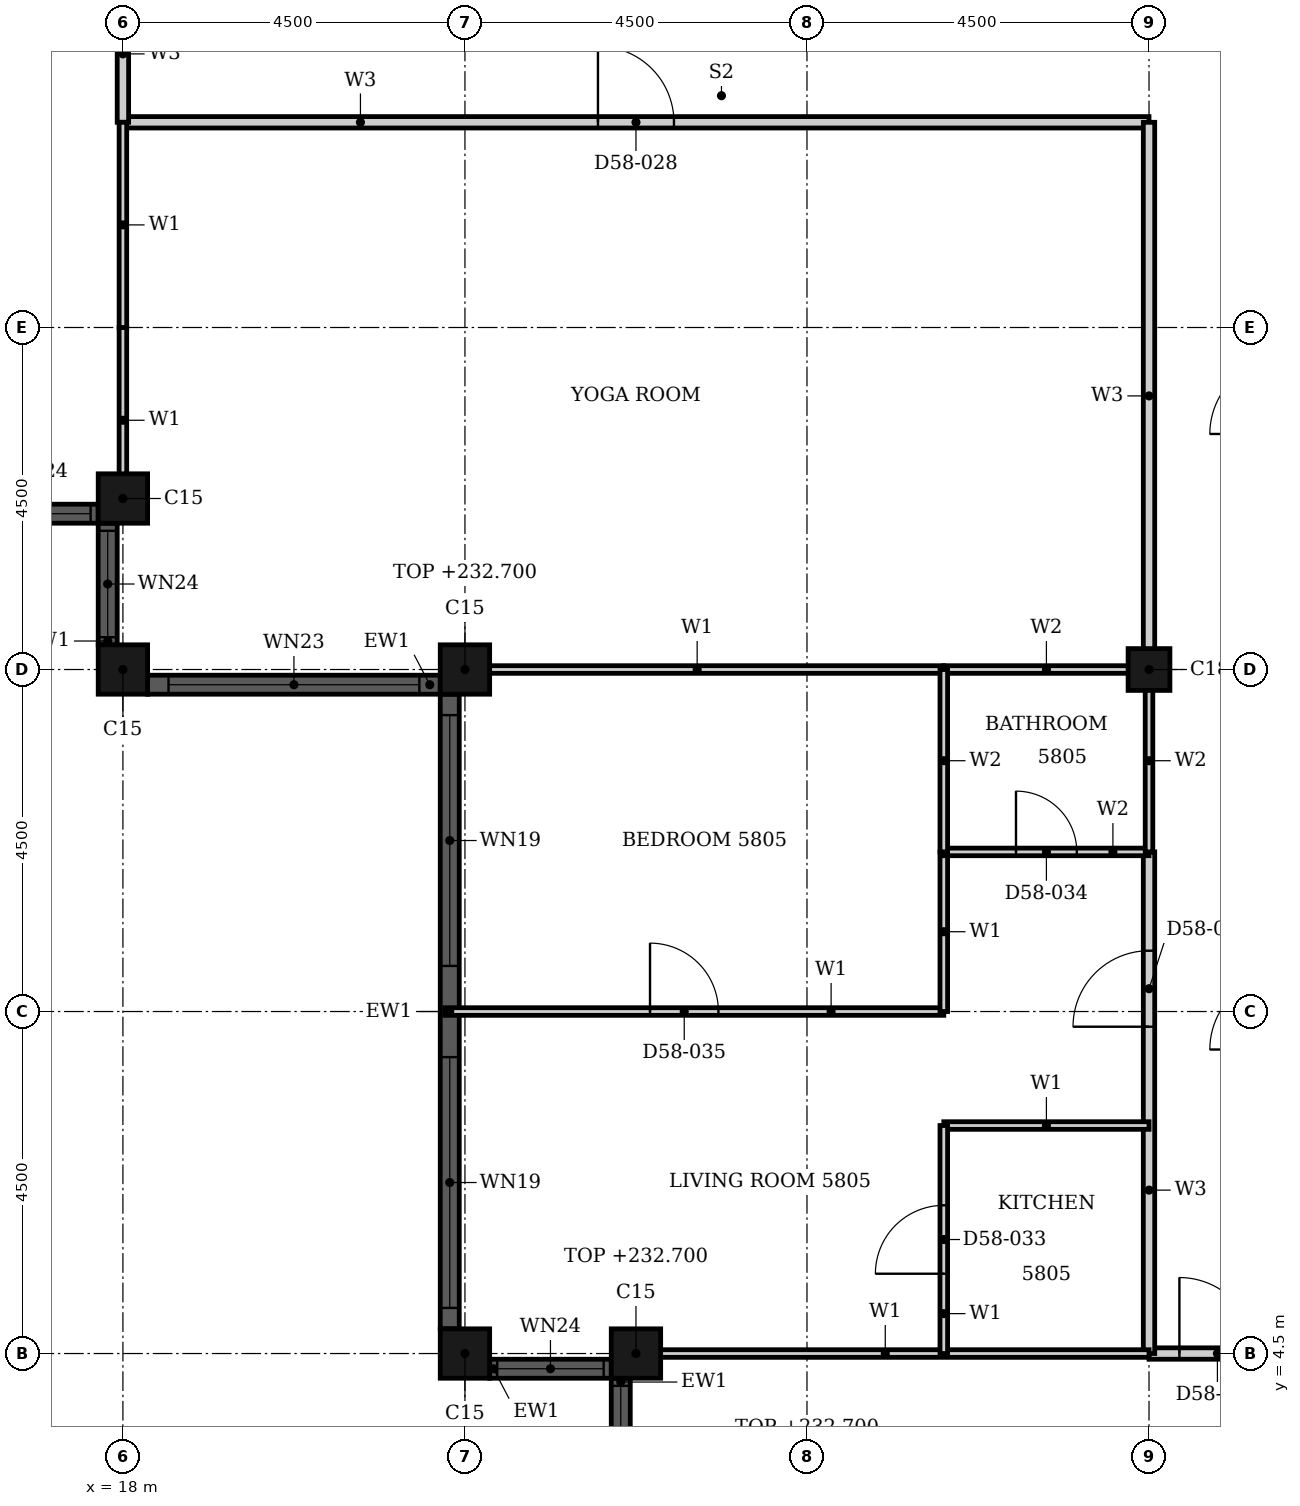
"""IFC4 building model, lengths in metres.
Left out: names, types, materials, properties, quantities, classifications, styles, units other than length and angle.
Written with IfcOpenShell. Run it as: python <this file> out.ifc"""

import sys

from ifc_helpers import new_model, si_unit, direction, frame, frame_2d, origin, origin_2d, place, context, subcontext, project, spatial, rectangle, hollow_rectangle, extrude, element, fill, save


model = new_model("IFC4")
c1 = context("Model", 3, precision=1e-05, world=origin(), true_north=direction((0.0, 1.0)))
c2 = subcontext(c1, "Body", "Model", "MODEL_VIEW")
j1 = project(units=[si_unit("LENGTHUNIT", "METRE"), si_unit("PLANEANGLEUNIT", "RADIAN")], contexts=[c1])
p1 = place(None, origin())
s1 = spatial("IfcSite", under=j1, at=p1, CompositionType="ELEMENT")
p2 = place(p1, origin())
s2 = spatial("IfcBuilding", under=s1, at=p2, CompositionType="ELEMENT")
p3 = place(p2, frame((0.0, 0.0, 229.4)))
s3 = spatial("IfcBuildingStorey", under=s2, at=p3, CompositionType="ELEMENT", Elevation=229.4)
for number, where, z_axis, x_axis in (
    (1, (18.0, 15.75, 0.0), (0.0, 0.0, 1.0), (1.0, 0.0, 0.0)),
    (2, (18.0, 13.5, 0.0), (0.0, 0.0, 1.0), (1.0, 0.0, 0.0)),
):
    element("IfcColumn", number, at=place(p3, frame(where, z_axis=z_axis, x_axis=x_axis)), inside=s3, PredefinedType="COLUMN", context=c2, shape_type="SweptSolid", body=[
        extrude(hollow_rectangle(XDim=0.65, YDim=0.65, WallThickness=0.021, at=origin_2d()), origin(), (0.0, 0.0, 1.0), 3.7),
    ])
for number, where, z_axis, x_axis in (
    (3, (22.5, 13.5, 0.0), (0.0, 0.0, 1.0), (1.0, 0.0, 0.0)),
    (4, (22.5, 4.5, 0.0), (0.0, 0.0, 1.0), (1.0, 0.0, 0.0)),
    (5, (24.75, 4.5, 0.0), (0.0, 0.0, 1.0), (1.0, 0.0, 0.0)),
):
    element("IfcColumn", number, at=place(p3, frame(where, z_axis=z_axis, x_axis=x_axis)), inside=s3, PredefinedType="COLUMN", context=c2, shape_type="SweptSolid", body=[
        extrude(hollow_rectangle(XDim=0.65, YDim=0.65, WallThickness=0.021, at=origin_2d()), origin(), (0.0, 0.0, 1.0), 3.3),
    ])
p4 = place(p3, frame((31.5, 13.5, 0.0), z_axis=(0.0, 0.0, 1.0), x_axis=(1.0, 0.0, 0.0)))
e6 = element("IfcColumn", 6, at=p4, inside=s3, PredefinedType="COLUMN", context=c2, shape_type="SweptSolid", body=[
    extrude(hollow_rectangle(XDim=0.55, YDim=0.55, WallThickness=0.018, at=origin_2d()), origin(), (0.0, 0.0, 1.0), 3.3),
])
p5 = place(p3, frame((16.075, 15.55, 0.0), z_axis=(0.0, 0.0, 1.0), x_axis=(1.0, 0.0, 0.0)))
e7 = element("IfcWall", 7, at=p5, inside=s3, PredefinedType="SOLIDWALL", context=c2, shape_type="SweptSolid", body=[
    extrude(rectangle(XDim=1.6, YDim=0.25, at=frame_2d((0.8, 0.0))), origin(), (0.0, 0.0, 1.0), 3.7),
])
p6 = place(p5, frame((0.1, 0.0, 0.9)))
e8 = element("IfcOpeningElement", 8, at=p6, cuts=e7, PredefinedType="OPENING", context=c2, shape_type="SweptSolid", body=[
    extrude(rectangle(XDim=1.4, YDim=1.75, at=frame_2d((0.7, 0.875))), frame((0.0, 0.135, 0.0), z_axis=(0.0, -1.0, 0.0), x_axis=(1.0, 0.0, 0.0)), (0.0, 0.0, 1.0), 0.27),
])
p7 = place(p3, frame((17.8, 15.425, 0.0), z_axis=(0.0, 0.0, 1.0), x_axis=(0.0, -1.0, 0.0)))
e9 = element("IfcWall", 9, at=p7, inside=s3, PredefinedType="SOLIDWALL", context=c2, shape_type="SweptSolid", body=[
    extrude(rectangle(XDim=1.6, YDim=0.25, at=frame_2d((0.8, 0.0))), origin(), (0.0, 0.0, 1.0), 3.7),
])
p8 = place(p7, frame((0.1, 0.0, 0.9)))
e10 = element("IfcOpeningElement", 10, at=p8, cuts=e9, PredefinedType="OPENING", context=c2, shape_type="SweptSolid", body=[
    extrude(rectangle(XDim=1.4, YDim=1.75, at=frame_2d((0.7, 0.875))), frame((0.0, 0.135, 0.0), z_axis=(0.0, -1.0, 0.0), x_axis=(1.0, 0.0, 0.0)), (0.0, 0.0, 1.0), 0.27),
])
p9 = place(p3, frame((18.325, 13.3, 0.0), z_axis=(0.0, 0.0, 1.0), x_axis=(1.0, 0.0, 0.0)))
e11 = element("IfcWall", 11, at=p9, inside=s3, PredefinedType="SOLIDWALL", context=c2, shape_type="SweptSolid", body=[
    extrude(rectangle(XDim=3.85, YDim=0.25, at=frame_2d((1.925, 0.0))), origin(), (0.0, 0.0, 1.0), 3.7),
])
p10 = place(p9, frame((0.275, 0.0, 0.45)))
e12 = element("IfcOpeningElement", 12, at=p10, cuts=e11, PredefinedType="OPENING", context=c2, shape_type="SweptSolid", body=[
    extrude(rectangle(XDim=3.3, YDim=1.9, at=frame_2d((1.65, 0.95))), frame((0.0, 0.135, 0.0), z_axis=(0.0, -1.0, 0.0), x_axis=(1.0, 0.0, 0.0)), (0.0, 0.0, 1.0), 0.27),
])
p11 = place(p3, frame((22.3, 13.175, 0.0), z_axis=(0.0, 0.0, 1.0), x_axis=(0.0, -1.0, 0.0)))
e13 = element("IfcWall", 13, at=p11, inside=s3, PredefinedType="SOLIDWALL", context=c2, shape_type="SweptSolid", body=[
    extrude(rectangle(XDim=8.35, YDim=0.25, at=frame_2d((4.175, 0.0))), origin(), (0.0, 0.0, 1.0), 3.7),
])
p12 = place(p11, frame((0.275, 0.0, 0.45)))
e14 = element("IfcOpeningElement", 14, at=p12, cuts=e13, PredefinedType="OPENING", context=c2, shape_type="SweptSolid", body=[
    extrude(rectangle(XDim=3.3, YDim=2.2, at=frame_2d((1.65, 1.1))), frame((0.0, 0.135, 0.0), z_axis=(0.0, -1.0, 0.0), x_axis=(1.0, 0.0, 0.0)), (0.0, 0.0, 1.0), 0.27),
])
p13 = place(p11, frame((4.775, 0.0, 0.45)))
e15 = element("IfcOpeningElement", 15, at=p13, cuts=e13, PredefinedType="OPENING", context=c2, shape_type="SweptSolid", body=[
    extrude(rectangle(XDim=3.3, YDim=2.2, at=frame_2d((1.65, 1.1))), frame((0.0, 0.135, 0.0), z_axis=(0.0, -1.0, 0.0), x_axis=(1.0, 0.0, 0.0)), (0.0, 0.0, 1.0), 0.27),
])
p14 = place(p3, frame((22.825, 4.3, 0.0), z_axis=(0.0, 0.0, 1.0), x_axis=(1.0, 0.0, 0.0)))
e16 = element("IfcWall", 16, at=p14, inside=s3, PredefinedType="SOLIDWALL", context=c2, shape_type="SweptSolid", body=[
    extrude(rectangle(XDim=1.6, YDim=0.25, at=frame_2d((0.8, 0.0))), origin(), (0.0, 0.0, 1.0), 3.7),
])
p15 = place(p14, frame((0.1, 0.0, 0.9)))
e17 = element("IfcOpeningElement", 17, at=p15, cuts=e16, PredefinedType="OPENING", context=c2, shape_type="SweptSolid", body=[
    extrude(rectangle(XDim=1.4, YDim=1.75, at=frame_2d((0.7, 0.875))), frame((0.0, 0.135, 0.0), z_axis=(0.0, -1.0, 0.0), x_axis=(1.0, 0.0, 0.0)), (0.0, 0.0, 1.0), 0.27),
])
p16 = place(p3, frame((24.55, 4.175, 0.0), z_axis=(0.0, 0.0, 1.0), x_axis=(0.0, -1.0, 0.0)))
e18 = element("IfcWall", 18, at=p16, inside=s3, PredefinedType="SOLIDWALL", context=c2, shape_type="SweptSolid", body=[
    extrude(rectangle(XDim=1.6, YDim=0.25, at=frame_2d((0.8, 0.0))), origin(), (0.0, 0.0, 1.0), 3.7),
])
p17 = place(p16, frame((0.1, 0.0, 0.9)))
e19 = element("IfcOpeningElement", 19, at=p17, cuts=e18, PredefinedType="OPENING", context=c2, shape_type="SweptSolid", body=[
    extrude(rectangle(XDim=1.4, YDim=1.75, at=frame_2d((0.7, 0.875))), frame((0.0, 0.135, 0.0), z_axis=(0.0, -1.0, 0.0), x_axis=(1.0, 0.0, 0.0)), (0.0, 0.0, 1.0), 0.27),
])
p18 = place(p3, frame((18.0, 20.7, 0.0), z_axis=(0.0, 0.0, 1.0), x_axis=(1.0, 0.0, 0.0)))
e20 = element("IfcWall", 20, at=p18, inside=s3, PredefinedType="PARTITIONING", context=c2, shape_type="SweptSolid", body=[
    extrude(rectangle(XDim=13.5, YDim=0.15, at=frame_2d((6.75, 0.0))), origin(), (0.0, 0.0, 1.0), 3.3),
])
p19 = place(p18, frame((6.25, 0.0, 0.0)))
e21 = element("IfcOpeningElement", 21, at=p19, cuts=e20, PredefinedType="OPENING", context=c2, shape_type="SweptSolid", body=[
    extrude(rectangle(XDim=1.0, YDim=2.1, at=frame_2d((0.5, 1.05))), frame((0.0, 0.085, 0.0), z_axis=(0.0, -1.0, 0.0), x_axis=(1.0, 0.0, 0.0)), (0.0, 0.0, 1.0), 0.17),
])
p20 = place(p3, frame((31.5, 4.5, 0.0), z_axis=(0.0, 0.0, 1.0), x_axis=(1.0, 0.0, 0.0)))
e22 = element("IfcWall", 22, at=p20, inside=s3, PredefinedType="PARTITIONING", context=c2, shape_type="SweptSolid", body=[
    extrude(rectangle(XDim=1.8, YDim=0.15, at=frame_2d((0.9, 0.0))), origin(), (0.0, 0.0, 1.0), 3.3),
])
p21 = place(p20, frame((0.4, 0.0, 0.0)))
e23 = element("IfcOpeningElement", 23, at=p21, cuts=e22, PredefinedType="OPENING", context=c2, shape_type="SweptSolid", body=[
    extrude(rectangle(XDim=1.0, YDim=2.1, at=frame_2d((0.5, 1.05))), frame((0.0, 0.085, 0.0), z_axis=(0.0, -1.0, 0.0), x_axis=(1.0, 0.0, 0.0)), (0.0, 0.0, 1.0), 0.17),
])
p22 = place(p3, frame((18.0, 20.7, 0.0), z_axis=(0.0, 0.0, 1.0), x_axis=(0.0, 1.0, 0.0)))
e24 = element("IfcWall", 24, at=p22, inside=s3, PredefinedType="PARTITIONING", context=c2, shape_type="SweptSolid", body=[
    extrude(rectangle(XDim=1.8, YDim=0.15, at=frame_2d((0.9, 0.0))), origin(), (0.0, 0.0, 1.0), 3.3),
])
p23 = place(p3, frame((31.5, 4.5, 0.0), z_axis=(0.0, 0.0, 1.0), x_axis=(0.0, 1.0, 0.0)))
e25 = element("IfcWall", 25, at=p23, inside=s3, PredefinedType="PARTITIONING", context=c2, shape_type="SweptSolid", body=[
    extrude(rectangle(XDim=6.6, YDim=0.15, at=frame_2d((3.3, 0.0))), origin(), (0.0, 0.0, 1.0), 2.58),
])
p24 = place(p23, frame((4.3, 0.0, 0.0)))
e26 = element("IfcOpeningElement", 26, at=p24, cuts=e25, PredefinedType="OPENING", context=c2, shape_type="SweptSolid", body=[
    extrude(rectangle(XDim=1.0, YDim=2.2, at=frame_2d((0.5, 1.1))), frame((0.0, 0.085, 0.0), z_axis=(0.0, -1.0, 0.0), x_axis=(1.0, 0.0, 0.0)), (0.0, 0.0, 1.0), 0.17),
])
p25 = place(p3, frame((31.5, 13.5, 0.0), z_axis=(0.0, 0.0, 1.0), x_axis=(0.0, 1.0, 0.0)))
e27 = element("IfcWall", 27, at=p25, inside=s3, PredefinedType="PARTITIONING", context=c2, shape_type="SweptSolid", body=[
    extrude(rectangle(XDim=7.2, YDim=0.15, at=frame_2d((3.6, 0.0))), origin(), (0.0, 0.0, 1.0), 3.3),
])
p26 = place(p3, frame((22.31, 13.5, 0.0), z_axis=(0.0, 0.0, 1.0), x_axis=(1.0, 0.0, 0.0)))
e28 = element("IfcWall", 28, at=p26, inside=s3, PredefinedType="PARTITIONING", context=c2, shape_type="SweptSolid", body=[
    extrude(rectangle(XDim=6.49, YDim=0.1, at=frame_2d((3.245, 0.0))), origin(), (0.0, 0.0, 1.0), 2.368),
])
p27 = place(p3, frame((24.56, 4.5, 0.0), z_axis=(0.0, 0.0, 1.0), x_axis=(1.0, 0.0, 0.0)))
e29 = element("IfcWall", 29, at=p27, inside=s3, PredefinedType="PARTITIONING", context=c2, shape_type="SweptSolid", body=[
    extrude(rectangle(XDim=6.94, YDim=0.1, at=frame_2d((3.47, 0.0))), origin(), (0.0, 0.0, 1.0), 3.3),
])
p28 = place(p3, frame((28.8, 7.5, 0.0), z_axis=(0.0, 0.0, 1.0), x_axis=(1.0, 0.0, 0.0)))
e30 = element("IfcWall", 30, at=p28, inside=s3, PredefinedType="PARTITIONING", context=c2, shape_type="SweptSolid", body=[
    extrude(rectangle(XDim=2.7, YDim=0.1, at=frame_2d((1.35, 0.0))), origin(), (0.0, 0.0, 1.0), 3.3),
])
p29 = place(p3, frame((22.235, 9.0, 0.0), z_axis=(0.0, 0.0, 1.0), x_axis=(1.0, 0.0, 0.0)))
e31 = element("IfcWall", 31, at=p29, inside=s3, PredefinedType="PARTITIONING", context=c2, shape_type="SweptSolid", body=[
    extrude(rectangle(XDim=6.565, YDim=0.1, at=frame_2d((3.282, 0.0))), origin(), (0.0, 0.0, 1.0), 3.3),
])
p30 = place(p29, frame((2.7, 0.0, 0.0)))
e32 = element("IfcOpeningElement", 32, at=p30, cuts=e31, PredefinedType="OPENING", context=c2, shape_type="SweptSolid", body=[
    extrude(rectangle(XDim=0.9, YDim=2.1, at=frame_2d((0.45, 1.05))), frame((0.0, 0.06, 0.0), z_axis=(0.0, -1.0, 0.0), x_axis=(1.0, 0.0, 0.0)), (0.0, 0.0, 1.0), 0.12),
])
p31 = place(p3, frame((18.0, 15.56, 0.0), z_axis=(0.0, 0.0, 1.0), x_axis=(0.0, 1.0, 0.0)))
e33 = element("IfcWall", 33, at=p31, inside=s3, PredefinedType="PARTITIONING", context=c2, shape_type="SweptSolid", body=[
    extrude(rectangle(XDim=2.439, YDim=0.1, at=frame_2d((1.219, 0.0))), origin(), (0.0, 0.0, 1.0), 3.3),
])
p32 = place(p3, frame((18.0, 18.0, 0.0), z_axis=(0.0, 0.0, 1.0), x_axis=(0.0, 1.0, 0.0)))
e34 = element("IfcWall", 34, at=p32, inside=s3, PredefinedType="PARTITIONING", context=c2, shape_type="SweptSolid", body=[
    extrude(rectangle(XDim=2.7, YDim=0.1, at=frame_2d((1.35, 0.0))), origin(), (0.0, 0.0, 1.0), 3.3),
])
p33 = place(p3, frame((28.8, 9.0, 0.0), z_axis=(0.0, 0.0, 1.0), x_axis=(0.0, 1.0, 0.0)))
e35 = element("IfcWall", 35, at=p33, inside=s3, PredefinedType="PARTITIONING", context=c2, shape_type="SweptSolid", body=[
    extrude(rectangle(XDim=2.1, YDim=0.1, at=frame_2d((1.05, 0.0))), origin(), (0.0, 0.0, 1.0), 3.3),
])
p34 = place(p3, frame((28.8, 4.5, 0.0), z_axis=(0.0, 0.0, 1.0), x_axis=(0.0, 1.0, 0.0)))
e36 = element("IfcWall", 36, at=p34, inside=s3, PredefinedType="PARTITIONING", context=c2, shape_type="SweptSolid", body=[
    extrude(rectangle(XDim=3.0, YDim=0.1, at=frame_2d((1.5, 0.0))), origin(), (0.0, 0.0, 1.0), 3.3),
])
p35 = place(p34, frame((1.05, 0.0, 0.0)))
e37 = element("IfcOpeningElement", 37, at=p35, cuts=e36, PredefinedType="OPENING", context=c2, shape_type="SweptSolid", body=[
    extrude(rectangle(XDim=0.9, YDim=2.1, at=frame_2d((0.45, 1.05))), frame((0.0, 0.06, 0.0), z_axis=(0.0, -1.0, 0.0), x_axis=(1.0, 0.0, 0.0)), (0.0, 0.0, 1.0), 0.12),
])
p36 = place(p3, frame((28.8, 11.1, 0.0), z_axis=(0.0, 0.0, 1.0), x_axis=(1.0, 0.0, 0.0)))
e38 = element("IfcWall", 38, at=p36, inside=s3, PredefinedType="PARTITIONING", context=c2, shape_type="SweptSolid", body=[
    extrude(rectangle(XDim=2.7, YDim=0.1, at=frame_2d((1.35, 0.0))), origin(), (0.0, 0.0, 1.0), 3.3),
])
p37 = place(p36, frame((0.95, 0.0, 0.0)))
e39 = element("IfcOpeningElement", 39, at=p37, cuts=e38, PredefinedType="OPENING", context=c2, shape_type="SweptSolid", body=[
    extrude(rectangle(XDim=0.8, YDim=2.1, at=frame_2d((0.4, 1.05))), frame((0.0, 0.06, 0.0), z_axis=(0.0, -1.0, 0.0), x_axis=(1.0, 0.0, 0.0)), (0.0, 0.0, 1.0), 0.12),
])
p38 = place(p3, frame((28.8, 13.5, 0.0), z_axis=(0.0, 0.0, 1.0), x_axis=(1.0, 0.0, 0.0)))
e40 = element("IfcWall", 40, at=p38, inside=s3, PredefinedType="PARTITIONING", context=c2, shape_type="SweptSolid", body=[
    extrude(rectangle(XDim=2.7, YDim=0.1, at=frame_2d((1.35, 0.0))), origin(), (0.0, 0.0, 1.0), 2.368),
])
p39 = place(p3, frame((28.8, 11.1, 0.0), z_axis=(0.0, 0.0, 1.0), x_axis=(0.0, 1.0, 0.0)))
e41 = element("IfcWall", 41, at=p39, inside=s3, PredefinedType="PARTITIONING", context=c2, shape_type="SweptSolid", body=[
    extrude(rectangle(XDim=2.4, YDim=0.1, at=frame_2d((1.2, 0.0))), origin(), (0.0, 0.0, 1.0), 3.3),
])
p40 = place(p3, frame((31.5, 11.1, 0.0), z_axis=(0.0, 0.0, 1.0), x_axis=(0.0, 1.0, 0.0)))
e42 = element("IfcWall", 42, at=p40, inside=s3, PredefinedType="PARTITIONING", context=c2, shape_type="SweptSolid", body=[
    extrude(rectangle(XDim=2.4, YDim=0.1, at=frame_2d((1.2, 0.0))), origin(), (0.0, 0.0, 1.0), 2.58),
])
p41 = place(p6, origin())
e43 = element("IfcWindow", 43, at=p41, inside=s3, PartitioningType="SINGLE_PANEL", PredefinedType="WINDOW", context=c2, shape_type="SweptSolid", body=[
    extrude(rectangle(XDim=1.4, YDim=1.75, at=frame_2d((0.7, 0.875))), frame((0.0, 0.03, 0.0), z_axis=(0.0, -1.0, 0.0), x_axis=(1.0, 0.0, 0.0)), (0.0, 0.0, 1.0), 0.06),
])
fill(e8, e43)
p42 = place(p8, origin())
e44 = element("IfcWindow", 44, at=p42, inside=s3, PartitioningType="SINGLE_PANEL", PredefinedType="WINDOW", context=c2, shape_type="SweptSolid", body=[
    extrude(rectangle(XDim=1.4, YDim=1.75, at=frame_2d((0.7, 0.875))), frame((0.0, 0.03, 0.0), z_axis=(0.0, -1.0, 0.0), x_axis=(1.0, 0.0, 0.0)), (0.0, 0.0, 1.0), 0.06),
])
fill(e10, e44)
p43 = place(p10, origin())
e45 = element("IfcWindow", 45, at=p43, inside=s3, PartitioningType="SINGLE_PANEL", PredefinedType="WINDOW", context=c2, shape_type="SweptSolid", body=[
    extrude(rectangle(XDim=3.3, YDim=1.9, at=frame_2d((1.65, 0.95))), frame((0.0, 0.03, 0.0), z_axis=(0.0, -1.0, 0.0), x_axis=(1.0, 0.0, 0.0)), (0.0, 0.0, 1.0), 0.06),
])
fill(e12, e45)
p44 = place(p12, origin())
e46 = element("IfcWindow", 46, at=p44, inside=s3, PartitioningType="SINGLE_PANEL", PredefinedType="WINDOW", context=c2, shape_type="SweptSolid", body=[
    extrude(rectangle(XDim=3.3, YDim=2.2, at=frame_2d((1.65, 1.1))), frame((0.0, 0.03, 0.0), z_axis=(0.0, -1.0, 0.0), x_axis=(1.0, 0.0, 0.0)), (0.0, 0.0, 1.0), 0.06),
])
fill(e14, e46)
p45 = place(p13, origin())
e47 = element("IfcWindow", 47, at=p45, inside=s3, PartitioningType="SINGLE_PANEL", PredefinedType="WINDOW", context=c2, shape_type="SweptSolid", body=[
    extrude(rectangle(XDim=3.3, YDim=2.2, at=frame_2d((1.65, 1.1))), frame((0.0, 0.03, 0.0), z_axis=(0.0, -1.0, 0.0), x_axis=(1.0, 0.0, 0.0)), (0.0, 0.0, 1.0), 0.06),
])
fill(e15, e47)
p46 = place(p15, origin())
e48 = element("IfcWindow", 48, at=p46, inside=s3, PartitioningType="SINGLE_PANEL", PredefinedType="WINDOW", context=c2, shape_type="SweptSolid", body=[
    extrude(rectangle(XDim=1.4, YDim=1.75, at=frame_2d((0.7, 0.875))), frame((0.0, 0.03, 0.0), z_axis=(0.0, -1.0, 0.0), x_axis=(1.0, 0.0, 0.0)), (0.0, 0.0, 1.0), 0.06),
])
fill(e17, e48)
p47 = place(p17, origin())
e49 = element("IfcWindow", 49, at=p47, inside=s3, PartitioningType="SINGLE_PANEL", PredefinedType="WINDOW", context=c2, shape_type="SweptSolid", body=[
    extrude(rectangle(XDim=1.4, YDim=1.75, at=frame_2d((0.7, 0.875))), frame((0.0, 0.03, 0.0), z_axis=(0.0, -1.0, 0.0), x_axis=(1.0, 0.0, 0.0)), (0.0, 0.0, 1.0), 0.06),
])
fill(e19, e49)
p48 = place(p19, origin())
e50 = element("IfcDoor", 50, at=p48, inside=s3, OperationType="SINGLE_SWING_RIGHT", PredefinedType="DOOR", context=c2, shape_type="SweptSolid", body=[
    extrude(rectangle(XDim=1.0, YDim=2.1, at=frame_2d((0.5, 1.05))), frame((0.0, 0.025, 0.0), z_axis=(0.0, -1.0, 0.0), x_axis=(1.0, 0.0, 0.0)), (0.0, 0.0, 1.0), 0.05),
])
fill(e21, e50)
p49 = place(p24, origin())
e51 = element("IfcDoor", 51, at=p49, inside=s3, OperationType="SINGLE_SWING_LEFT", PredefinedType="DOOR", context=c2, shape_type="SweptSolid", body=[
    extrude(rectangle(XDim=1.0, YDim=2.2, at=frame_2d((0.5, 1.1))), frame((0.0, 0.025, 0.0), z_axis=(0.0, -1.0, 0.0), x_axis=(1.0, 0.0, 0.0)), (0.0, 0.0, 1.0), 0.05),
])
fill(e26, e51)
p50 = place(p35, origin())
e52 = element("IfcDoor", 52, at=p50, inside=s3, OperationType="SINGLE_SWING_RIGHT", PredefinedType="DOOR", context=c2, shape_type="SweptSolid", body=[
    extrude(rectangle(XDim=0.9, YDim=2.1, at=frame_2d((0.45, 1.05))), frame((0.0, 0.025, 0.0), z_axis=(0.0, -1.0, 0.0), x_axis=(1.0, 0.0, 0.0)), (0.0, 0.0, 1.0), 0.05),
])
fill(e37, e52)
p51 = place(p37, origin())
e53 = element("IfcDoor", 53, at=p51, inside=s3, OperationType="SINGLE_SWING_LEFT", PredefinedType="DOOR", context=c2, shape_type="SweptSolid", body=[
    extrude(rectangle(XDim=0.8, YDim=2.1, at=frame_2d((0.4, 1.05))), frame((0.0, 0.025, 0.0), z_axis=(0.0, -1.0, 0.0), x_axis=(1.0, 0.0, 0.0)), (0.0, 0.0, 1.0), 0.05),
])
fill(e39, e53)
p52 = place(p30, origin())
e54 = element("IfcDoor", 54, at=p52, inside=s3, OperationType="SINGLE_SWING_RIGHT", PredefinedType="DOOR", context=c2, shape_type="SweptSolid", body=[
    extrude(rectangle(XDim=0.9, YDim=2.1, at=frame_2d((0.45, 1.05))), frame((0.0, 0.025, 0.0), z_axis=(0.0, -1.0, 0.0), x_axis=(1.0, 0.0, 0.0)), (0.0, 0.0, 1.0), 0.05),
])
fill(e32, e54)
p53 = place(p21, origin())
e55 = element("IfcDoor", 55, at=p53, inside=s3, OperationType="SINGLE_SWING_RIGHT", PredefinedType="DOOR", context=c2, shape_type="SweptSolid", body=[
    extrude(rectangle(XDim=1.0, YDim=2.1, at=frame_2d((0.5, 1.05))), frame((0.0, 0.025, 0.0), z_axis=(0.0, -1.0, 0.0), x_axis=(1.0, 0.0, 0.0)), (0.0, 0.0, 1.0), 0.05),
])
fill(e23, e55)
save(model, sys.argv[1])
